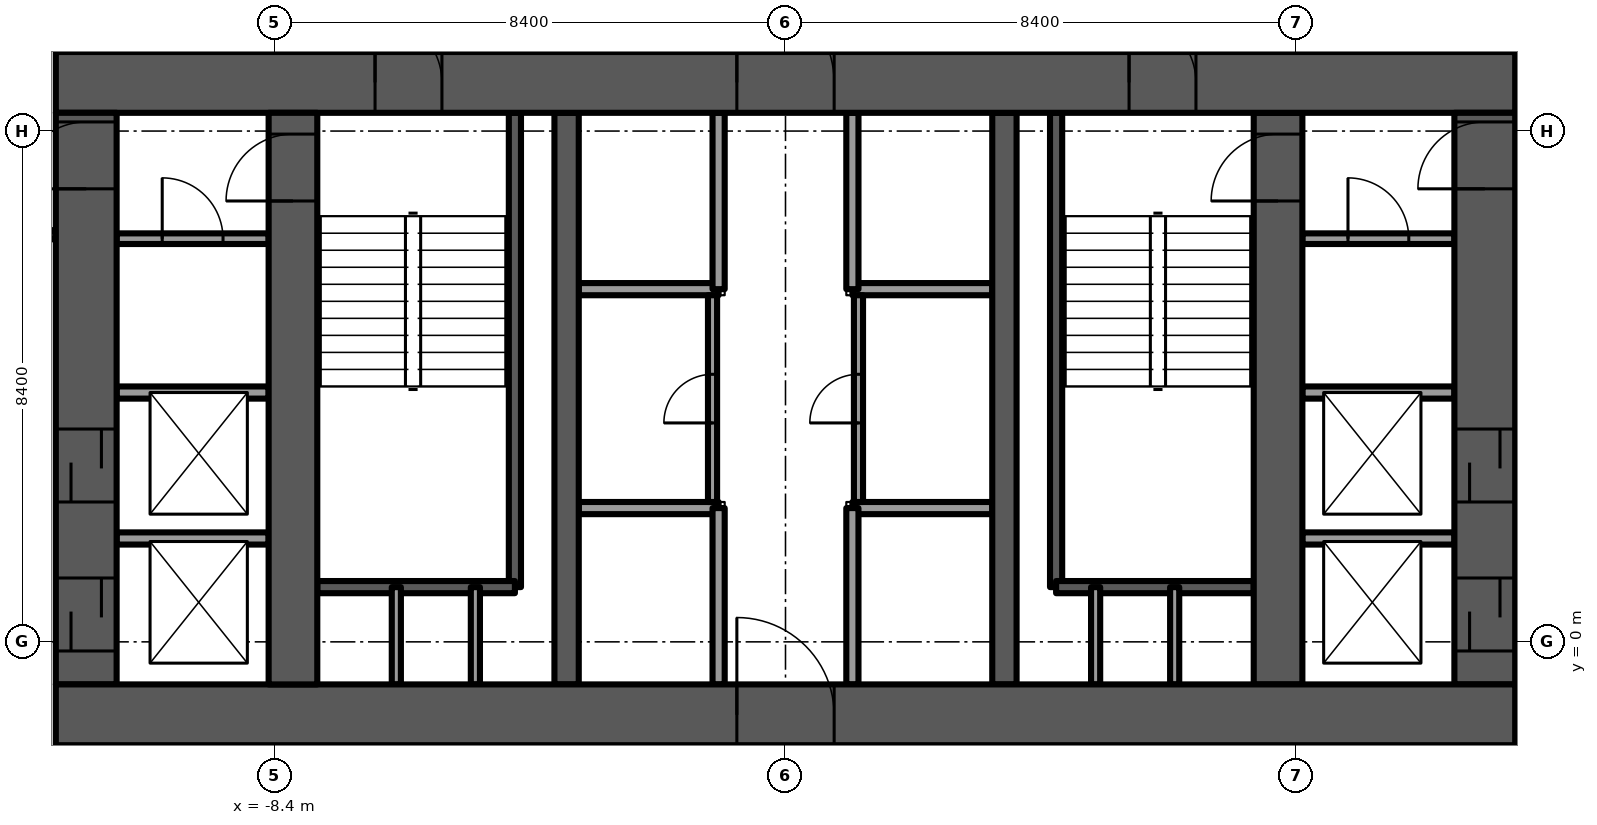
"""IFC4 building model, lengths in metres.
Left out: names, types, materials, properties, quantities, classifications, styles, units other than length and angle.
Written with IfcOpenShell. Run it as: python <this file> out.ifc"""

import sys

from ifc_helpers import new_model, si_unit, direction, frame, frame_2d, origin, place, context, subcontext, project, spatial, rectangle, extrude, element, fill, save


model = new_model("IFC4")
c1 = context("Model", 3, precision=1e-05, world=origin(), true_north=direction((0.0, 1.0)))
c2 = subcontext(c1, "Body", "Model", "MODEL_VIEW")
j1 = project(units=[si_unit("LENGTHUNIT", "METRE"), si_unit("PLANEANGLEUNIT", "RADIAN")], contexts=[c1])
p1 = place(None, origin())
s1 = spatial("IfcSite", under=j1, at=p1, CompositionType="ELEMENT")
p2 = place(p1, origin())
s2 = spatial("IfcBuilding", under=s1, at=p2, CompositionType="ELEMENT")
p3 = place(p2, frame((0.0, 0.0, 131.0)))
s3 = spatial("IfcBuildingStorey", under=s2, at=p3, CompositionType="ELEMENT", Elevation=131.0)
p4 = place(p3, frame((-12.0, -1.2, -0.3), z_axis=(0.0, 0.0, 1.0), x_axis=(1.0, 0.0, 0.0)))
e1 = element("IfcWall", 1, at=p4, inside=s3, PredefinedType="SHEAR", context=c2, shape_type="SweptSolid", body=[
    extrude(rectangle(XDim=24.0, YDim=1.0, at=frame_2d((12.0, 0.0))), origin(), (0.0, 0.0, 1.0), 3.75),
])
p5 = place(p4, frame((11.2, 0.0, 0.0)))
e2 = element("IfcOpeningElement", 2, at=p5, cuts=e1, PredefinedType="OPENING", context=c2, shape_type="SweptSolid", body=[
    extrude(rectangle(XDim=1.6, YDim=2.1, at=frame_2d((0.8, 1.05))), frame((0.0, 0.5, 0.0), z_axis=(0.0, -1.0, 0.0), x_axis=(1.0, 0.0, 0.0)), (0.0, 0.0, 1.0), 1.0),
])
p6 = place(p3, frame((-12.0, 9.2, -0.3), z_axis=(0.0, 0.0, 1.0), x_axis=(1.0, 0.0, 0.0)))
e3 = element("IfcWall", 3, at=p6, inside=s3, PredefinedType="SHEAR", context=c2, shape_type="SweptSolid", body=[
    extrude(rectangle(XDim=24.0, YDim=1.0, at=frame_2d((12.0, 0.0))), origin(), (0.0, 0.0, 1.0), 3.75),
])
p7 = place(p6, frame((11.2, 0.0, 0.0)))
e4 = element("IfcOpeningElement", 4, at=p7, cuts=e3, PredefinedType="OPENING", context=c2, shape_type="SweptSolid", body=[
    extrude(rectangle(XDim=1.6, YDim=2.1, at=frame_2d((0.8, 1.05))), frame((0.0, 0.5, 0.0), z_axis=(0.0, -1.0, 0.0), x_axis=(1.0, 0.0, 0.0)), (0.0, 0.0, 1.0), 1.0),
])
p8 = place(p6, frame((5.25, 0.0, 0.0)))
e5 = element("IfcOpeningElement", 5, at=p8, cuts=e3, PredefinedType="OPENING", context=c2, shape_type="SweptSolid", body=[
    extrude(rectangle(XDim=1.1, YDim=2.1, at=frame_2d((0.55, 1.05))), frame((0.0, 0.5, 0.0), z_axis=(0.0, -1.0, 0.0), x_axis=(1.0, 0.0, 0.0)), (0.0, 0.0, 1.0), 1.0),
])
p9 = place(p6, frame((17.65, 0.0, 0.0)))
e6 = element("IfcOpeningElement", 6, at=p9, cuts=e3, PredefinedType="OPENING", context=c2, shape_type="SweptSolid", body=[
    extrude(rectangle(XDim=1.1, YDim=2.1, at=frame_2d((0.55, 1.05))), frame((0.0, 0.5, 0.0), z_axis=(0.0, -1.0, 0.0), x_axis=(1.0, 0.0, 0.0)), (0.0, 0.0, 1.0), 1.0),
])
p10 = place(p3, frame((-8.1, -0.7, -0.3), z_axis=(0.0, 0.0, 1.0), x_axis=(0.0, 1.0, 0.0)))
e7 = element("IfcWall", 7, at=p10, inside=s3, PredefinedType="SHEAR", context=c2, shape_type="SweptSolid", body=[
    extrude(rectangle(XDim=9.4, YDim=0.8, at=frame_2d((4.7, 0.0))), origin(), (0.0, 0.0, 1.0), 3.75),
])
p11 = place(p10, frame((7.95, 0.0, 0.0)))
e8 = element("IfcOpeningElement", 8, at=p11, cuts=e7, PredefinedType="OPENING", context=c2, shape_type="SweptSolid", body=[
    extrude(rectangle(XDim=1.1, YDim=2.1, at=frame_2d((0.55, 1.05))), frame((0.0, 0.4, 0.0), z_axis=(0.0, -1.0, 0.0), x_axis=(1.0, 0.0, 0.0)), (0.0, 0.0, 1.0), 0.8),
])
p12 = place(p3, frame((8.1, -0.7, -0.3), z_axis=(0.0, 0.0, 1.0), x_axis=(0.0, 1.0, 0.0)))
e9 = element("IfcWall", 9, at=p12, inside=s3, PredefinedType="SHEAR", context=c2, shape_type="SweptSolid", body=[
    extrude(rectangle(XDim=9.4, YDim=0.8, at=frame_2d((4.7, 0.0))), origin(), (0.0, 0.0, 1.0), 3.75),
])
p13 = place(p12, frame((7.95, 0.0, 0.0)))
e10 = element("IfcOpeningElement", 10, at=p13, cuts=e9, PredefinedType="OPENING", context=c2, shape_type="SweptSolid", body=[
    extrude(rectangle(XDim=1.1, YDim=2.1, at=frame_2d((0.55, 1.05))), frame((0.0, 0.4, 0.0), z_axis=(0.0, -1.0, 0.0), x_axis=(1.0, 0.0, 0.0)), (0.0, 0.0, 1.0), 0.8),
])
for number, where, z_axis, x_axis in (
    (11, (-3.6, -0.7, -0.3), (0.0, 0.0, 1.0), (0.0, 1.0, 0.0)),
    (12, (3.6, -0.7, -0.3), (0.0, 0.0, 1.0), (0.0, 1.0, 0.0)),
):
    element("IfcWall", number, at=place(p3, frame(where, z_axis=z_axis, x_axis=x_axis)), inside=s3, PredefinedType="SHEAR", context=c2, shape_type="SweptSolid", body=[
        extrude(rectangle(XDim=9.4, YDim=0.4, at=frame_2d((4.7, 0.0))), origin(), (0.0, 0.0, 1.0), 3.75),
    ])
p14 = place(p3, frame((-11.5, -0.7, -0.3), z_axis=(0.0, 0.0, 1.0), x_axis=(0.0, 1.0, 0.0)))
e13 = element("IfcWall", 13, at=p14, inside=s3, PredefinedType="SHEAR", context=c2, shape_type="SweptSolid", body=[
    extrude(rectangle(XDim=9.4, YDim=1.0, at=frame_2d((4.7, 0.0))), origin(), (0.0, 0.0, 1.0), 3.75),
])
p15 = place(p14, frame((8.15, 0.0, 0.0)))
e14 = element("IfcOpeningElement", 14, at=p15, cuts=e13, PredefinedType="OPENING", context=c2, shape_type="SweptSolid", body=[
    extrude(rectangle(XDim=1.1, YDim=2.1, at=frame_2d((0.55, 1.05))), frame((0.0, 0.5, 0.0), z_axis=(0.0, -1.0, 0.0), x_axis=(1.0, 0.0, 0.0)), (0.0, 0.0, 1.0), 1.0),
])
p16 = place(p14, frame((0.55, 0.0, 0.0)))
e15 = element("IfcOpeningElement", 15, at=p16, cuts=e13, PredefinedType="OPENING", context=c2, shape_type="SweptSolid", body=[
    extrude(rectangle(XDim=1.2, YDim=2.1, at=frame_2d((0.6, 1.05))), frame((0.0, 0.5, 0.0), z_axis=(0.0, -1.0, 0.0), x_axis=(1.0, 0.0, 0.0)), (0.0, 0.0, 1.0), 1.0),
])
p17 = place(p14, frame((3.0, 0.0, 0.0)))
e16 = element("IfcOpeningElement", 16, at=p17, cuts=e13, PredefinedType="OPENING", context=c2, shape_type="SweptSolid", body=[
    extrude(rectangle(XDim=1.2, YDim=2.1, at=frame_2d((0.6, 1.05))), frame((0.0, 0.5, 0.0), z_axis=(0.0, -1.0, 0.0), x_axis=(1.0, 0.0, 0.0)), (0.0, 0.0, 1.0), 1.0),
])
p18 = place(p3, frame((11.5, -0.7, -0.3), z_axis=(0.0, 0.0, 1.0), x_axis=(0.0, 1.0, 0.0)))
e17 = element("IfcWall", 17, at=p18, inside=s3, PredefinedType="SHEAR", context=c2, shape_type="SweptSolid", body=[
    extrude(rectangle(XDim=9.4, YDim=1.0, at=frame_2d((4.7, 0.0))), origin(), (0.0, 0.0, 1.0), 3.75),
])
p19 = place(p18, frame((8.15, 0.0, 0.0)))
e18 = element("IfcOpeningElement", 18, at=p19, cuts=e17, PredefinedType="OPENING", context=c2, shape_type="SweptSolid", body=[
    extrude(rectangle(XDim=1.1, YDim=2.1, at=frame_2d((0.55, 1.05))), frame((0.0, 0.5, 0.0), z_axis=(0.0, -1.0, 0.0), x_axis=(1.0, 0.0, 0.0)), (0.0, 0.0, 1.0), 1.0),
])
p20 = place(p18, frame((0.55, 0.0, 0.0)))
e19 = element("IfcOpeningElement", 19, at=p20, cuts=e17, PredefinedType="OPENING", context=c2, shape_type="SweptSolid", body=[
    extrude(rectangle(XDim=1.2, YDim=2.1, at=frame_2d((0.6, 1.05))), frame((0.0, 0.5, 0.0), z_axis=(0.0, -1.0, 0.0), x_axis=(1.0, 0.0, 0.0)), (0.0, 0.0, 1.0), 1.0),
])
p21 = place(p18, frame((3.0, 0.0, 0.0)))
e20 = element("IfcOpeningElement", 20, at=p21, cuts=e17, PredefinedType="OPENING", context=c2, shape_type="SweptSolid", body=[
    extrude(rectangle(XDim=1.2, YDim=2.1, at=frame_2d((0.6, 1.05))), frame((0.0, 0.5, 0.0), z_axis=(0.0, -1.0, 0.0), x_axis=(1.0, 0.0, 0.0)), (0.0, 0.0, 1.0), 1.0),
])
for number, where, z_axis, x_axis in (
    (21, (-3.4, 2.2, 0.0), (0.0, 0.0, 1.0), (1.0, 0.0, 0.0)),
    (22, (-3.4, 5.8, 0.0), (0.0, 0.0, 1.0), (1.0, 0.0, 0.0)),
    (23, (1.1, 2.2, 0.0), (0.0, 0.0, 1.0), (1.0, 0.0, 0.0)),
    (24, (1.1, 5.8, 0.0), (0.0, 0.0, 1.0), (1.0, 0.0, 0.0)),
):
    element("IfcWall", number, at=place(p3, frame(where, z_axis=z_axis, x_axis=x_axis)), inside=s3, PredefinedType="PARTITIONING", context=c2, shape_type="SweptSolid", body=[
        extrude(rectangle(XDim=2.3, YDim=0.2, at=frame_2d((1.15, 0.0))), origin(), (0.0, 0.0, 1.0), 3.45),
    ])
for number, where, z_axis, x_axis in (
    (25, (-1.1, -0.7, 0.0), (0.0, 0.0, 1.0), (0.0, 1.0, 0.0)),
    (26, (1.1, -0.7, 0.0), (0.0, 0.0, 1.0), (0.0, 1.0, 0.0)),
    (27, (-1.1, 5.8, 0.0), (0.0, 0.0, 1.0), (0.0, 1.0, 0.0)),
    (28, (1.1, 5.8, 0.0), (0.0, 0.0, 1.0), (0.0, 1.0, 0.0)),
):
    element("IfcWall", number, at=place(p3, frame(where, z_axis=z_axis, x_axis=x_axis)), inside=s3, PredefinedType="PARTITIONING", context=c2, shape_type="SweptSolid", body=[
        extrude(rectangle(XDim=2.9, YDim=0.2, at=frame_2d((1.45, 0.0))), origin(), (0.0, 0.0, 1.0), 3.45),
    ])
p22 = place(p3, frame((-4.45, 0.9, -0.3), z_axis=(0.0, 0.0, 1.0), x_axis=(0.0, 1.0, 0.0)))
e29 = element("IfcWall", 29, at=p22, inside=s3, PredefinedType="SOLIDWALL", context=c2, shape_type="SweptSolid", body=[
    extrude(rectangle(XDim=7.8, YDim=0.2, at=frame_2d((3.9, 0.0))), origin(), (0.0, 0.0, 1.0), 3.75),
])
p23 = place(p3, frame((-7.7, 0.9, -0.3), z_axis=(0.0, 0.0, 1.0), x_axis=(1.0, 0.0, 0.0)))
e30 = element("IfcWall", 30, at=p23, inside=s3, PredefinedType="SOLIDWALL", context=c2, shape_type="SweptSolid", body=[
    extrude(rectangle(XDim=3.25, YDim=0.2, at=frame_2d((1.625, 0.0))), origin(), (0.0, 0.0, 1.0), 3.75),
])
for number, where, z_axis, x_axis in (
    (31, (-6.4, -0.7, 0.0), (0.0, 0.0, 1.0), (0.0, 1.0, 0.0)),
    (32, (-5.1, -0.7, 0.0), (0.0, 0.0, 1.0), (0.0, 1.0, 0.0)),
):
    element("IfcWall", number, at=place(p3, frame(where, z_axis=z_axis, x_axis=x_axis)), inside=s3, PredefinedType="PARTITIONING", context=c2, shape_type="SweptSolid", body=[
        extrude(rectangle(XDim=1.6, YDim=0.15, at=frame_2d((0.8, 0.0))), origin(), (0.0, 0.0, 1.0), 3.45),
    ])
p24 = place(p3, frame((4.45, 0.9, -0.3), z_axis=(0.0, 0.0, 1.0), x_axis=(0.0, 1.0, 0.0)))
e33 = element("IfcWall", 33, at=p24, inside=s3, PredefinedType="SOLIDWALL", context=c2, shape_type="SweptSolid", body=[
    extrude(rectangle(XDim=7.8, YDim=0.2, at=frame_2d((3.9, 0.0))), origin(), (0.0, 0.0, 1.0), 3.75),
])
p25 = place(p3, frame((4.45, 0.9, -0.3), z_axis=(0.0, 0.0, 1.0), x_axis=(1.0, 0.0, 0.0)))
e34 = element("IfcWall", 34, at=p25, inside=s3, PredefinedType="SOLIDWALL", context=c2, shape_type="SweptSolid", body=[
    extrude(rectangle(XDim=3.25, YDim=0.2, at=frame_2d((1.625, 0.0))), origin(), (0.0, 0.0, 1.0), 3.75),
])
for number, where, z_axis, x_axis in (
    (35, (5.1, -0.7, 0.0), (0.0, 0.0, 1.0), (0.0, 1.0, 0.0)),
    (36, (6.4, -0.7, 0.0), (0.0, 0.0, 1.0), (0.0, 1.0, 0.0)),
):
    element("IfcWall", number, at=place(p3, frame(where, z_axis=z_axis, x_axis=x_axis)), inside=s3, PredefinedType="PARTITIONING", context=c2, shape_type="SweptSolid", body=[
        extrude(rectangle(XDim=1.6, YDim=0.15, at=frame_2d((0.8, 0.0))), origin(), (0.0, 0.0, 1.0), 3.45),
    ])
p26 = place(p3, frame((-1.2, 2.3, 0.0), z_axis=(0.0, 0.0, 1.0), x_axis=(0.0, 1.0, 0.0)))
e37 = element("IfcWall", 37, at=p26, inside=s3, PredefinedType="PARTITIONING", context=c2, shape_type="SweptSolid", body=[
    extrude(rectangle(XDim=3.4, YDim=0.15, at=frame_2d((1.7, 0.0))), origin(), (0.0, 0.0, 1.0), 3.45),
])
p27 = place(p26, frame((1.3, 0.0, 0.0)))
e38 = element("IfcOpeningElement", 38, at=p27, cuts=e37, PredefinedType="OPENING", context=c2, shape_type="SweptSolid", body=[
    extrude(rectangle(XDim=0.8, YDim=2.1, at=frame_2d((0.4, 1.05))), frame((0.0, 0.075, 0.0), z_axis=(0.0, -1.0, 0.0), x_axis=(1.0, 0.0, 0.0)), (0.0, 0.0, 1.0), 0.15),
])
p28 = place(p3, frame((1.2, 2.3, 0.0), z_axis=(0.0, 0.0, 1.0), x_axis=(0.0, 1.0, 0.0)))
e39 = element("IfcWall", 39, at=p28, inside=s3, PredefinedType="PARTITIONING", context=c2, shape_type="SweptSolid", body=[
    extrude(rectangle(XDim=3.4, YDim=0.15, at=frame_2d((1.7, 0.0))), origin(), (0.0, 0.0, 1.0), 3.45),
])
p29 = place(p28, frame((1.3, 0.0, 0.0)))
e40 = element("IfcOpeningElement", 40, at=p29, cuts=e39, PredefinedType="OPENING", context=c2, shape_type="SweptSolid", body=[
    extrude(rectangle(XDim=0.8, YDim=2.1, at=frame_2d((0.4, 1.05))), frame((0.0, 0.075, 0.0), z_axis=(0.0, -1.0, 0.0), x_axis=(1.0, 0.0, 0.0)), (0.0, 0.0, 1.0), 0.15),
])
for number, where, z_axis, x_axis in (
    (41, (-11.0, 1.7, 0.0), (0.0, 0.0, 1.0), (1.0, 0.0, 0.0)),
    (42, (-11.0, 4.1, 0.0), (0.0, 0.0, 1.0), (1.0, 0.0, 0.0)),
):
    element("IfcWall", number, at=place(p3, frame(where, z_axis=z_axis, x_axis=x_axis)), inside=s3, PredefinedType="PARTITIONING", context=c2, shape_type="SweptSolid", body=[
        extrude(rectangle(XDim=2.5, YDim=0.2, at=frame_2d((1.25, 0.0))), origin(), (0.0, 0.0, 1.0), 3.45),
    ])
p30 = place(p3, frame((-11.0, 6.63, 0.0), z_axis=(0.0, 0.0, 1.0), x_axis=(1.0, 0.0, 0.0)))
e43 = element("IfcWall", 43, at=p30, inside=s3, PredefinedType="PARTITIONING", context=c2, shape_type="SweptSolid", body=[
    extrude(rectangle(XDim=2.5, YDim=0.175, at=frame_2d((1.25, 0.0))), origin(), (0.0, 0.0, 1.0), 3.45),
])
p31 = place(p30, frame((0.75, 0.0, 0.0)))
e44 = element("IfcOpeningElement", 44, at=p31, cuts=e43, PredefinedType="OPENING", context=c2, shape_type="SweptSolid", body=[
    extrude(rectangle(XDim=1.0, YDim=2.1, at=frame_2d((0.5, 1.05))), frame((0.0, 0.087, 0.0), z_axis=(0.0, -1.0, 0.0), x_axis=(1.0, 0.0, 0.0)), (0.0, 0.0, 1.0), 0.175),
])
for number, where, z_axis, x_axis in (
    (45, (8.5, 1.7, 0.0), (0.0, 0.0, 1.0), (1.0, 0.0, 0.0)),
    (46, (8.5, 4.1, 0.0), (0.0, 0.0, 1.0), (1.0, 0.0, 0.0)),
):
    element("IfcWall", number, at=place(p3, frame(where, z_axis=z_axis, x_axis=x_axis)), inside=s3, PredefinedType="PARTITIONING", context=c2, shape_type="SweptSolid", body=[
        extrude(rectangle(XDim=2.5, YDim=0.2, at=frame_2d((1.25, 0.0))), origin(), (0.0, 0.0, 1.0), 3.45),
    ])
p32 = place(p3, frame((8.5, 6.63, 0.0), z_axis=(0.0, 0.0, 1.0), x_axis=(1.0, 0.0, 0.0)))
e47 = element("IfcWall", 47, at=p32, inside=s3, PredefinedType="PARTITIONING", context=c2, shape_type="SweptSolid", body=[
    extrude(rectangle(XDim=2.5, YDim=0.175, at=frame_2d((1.25, 0.0))), origin(), (0.0, 0.0, 1.0), 3.45),
])
p33 = place(p32, frame((0.75, 0.0, 0.0)))
e48 = element("IfcOpeningElement", 48, at=p33, cuts=e47, PredefinedType="OPENING", context=c2, shape_type="SweptSolid", body=[
    extrude(rectangle(XDim=1.0, YDim=2.1, at=frame_2d((0.5, 1.05))), frame((0.0, 0.087, 0.0), z_axis=(0.0, -1.0, 0.0), x_axis=(1.0, 0.0, 0.0)), (0.0, 0.0, 1.0), 0.175),
])
for number, where, z_axis, x_axis in (
    (49, (-13.44, 6.695, 0.0), (0.0, 0.0, 1.0), (1.0, 0.0, 0.0)),
    (50, (12.01, 6.695, 0.0), (0.0, 0.0, 1.0), (1.0, 0.0, 0.0)),
):
    element("IfcWall", number, at=place(p3, frame(where, z_axis=z_axis, x_axis=x_axis)), inside=s3, PredefinedType="PARTITIONING", context=c2, shape_type="SweptSolid", body=[
        extrude(rectangle(XDim=1.43, YDim=0.15, at=frame_2d((0.715, 0.0))), origin(), (0.0, 0.0, 1.0), 3.45),
    ])
p34 = place(p5, origin())
e51 = element("IfcDoor", 51, at=p34, inside=s3, OperationType="DOUBLE_DOOR_SINGLE_SWING", PredefinedType="DOOR", context=c2, shape_type="SweptSolid", body=[
    extrude(rectangle(XDim=1.6, YDim=2.1, at=frame_2d((0.8, 1.05))), frame((0.0, 0.025, 0.0), z_axis=(0.0, -1.0, 0.0), x_axis=(1.0, 0.0, 0.0)), (0.0, 0.0, 1.0), 0.05),
])
fill(e2, e51)
p35 = place(p7, origin())
e52 = element("IfcDoor", 52, at=p35, inside=s3, OperationType="DOUBLE_DOOR_SINGLE_SWING", PredefinedType="DOOR", context=c2, shape_type="SweptSolid", body=[
    extrude(rectangle(XDim=1.6, YDim=2.1, at=frame_2d((0.8, 1.05))), frame((0.0, 0.025, 0.0), z_axis=(0.0, -1.0, 0.0), x_axis=(1.0, 0.0, 0.0)), (0.0, 0.0, 1.0), 0.05),
])
fill(e4, e52)
p36 = place(p8, origin())
e53 = element("IfcDoor", 53, at=p36, inside=s3, OperationType="SINGLE_SWING_LEFT", PredefinedType="DOOR", context=c2, shape_type="SweptSolid", body=[
    extrude(rectangle(XDim=1.1, YDim=2.1, at=frame_2d((0.55, 1.05))), frame((0.0, 0.025, 0.0), z_axis=(0.0, -1.0, 0.0), x_axis=(1.0, 0.0, 0.0)), (0.0, 0.0, 1.0), 0.05),
])
fill(e5, e53)
p37 = place(p11, origin())
e54 = element("IfcDoor", 54, at=p37, inside=s3, OperationType="SINGLE_SWING_RIGHT", PredefinedType="DOOR", context=c2, shape_type="SweptSolid", body=[
    extrude(rectangle(XDim=1.1, YDim=2.1, at=frame_2d((0.55, 1.05))), frame((0.0, 0.025, 0.0), z_axis=(0.0, -1.0, 0.0), x_axis=(1.0, 0.0, 0.0)), (0.0, 0.0, 1.0), 0.05),
])
fill(e8, e54)
p38 = place(p9, origin())
e55 = element("IfcDoor", 55, at=p38, inside=s3, OperationType="SINGLE_SWING_RIGHT", PredefinedType="DOOR", context=c2, shape_type="SweptSolid", body=[
    extrude(rectangle(XDim=1.1, YDim=2.1, at=frame_2d((0.55, 1.05))), frame((0.0, 0.025, 0.0), z_axis=(0.0, -1.0, 0.0), x_axis=(1.0, 0.0, 0.0)), (0.0, 0.0, 1.0), 0.05),
])
fill(e6, e55)
p39 = place(p13, origin())
e56 = element("IfcDoor", 56, at=p39, inside=s3, OperationType="SINGLE_SWING_LEFT", PredefinedType="DOOR", context=c2, shape_type="SweptSolid", body=[
    extrude(rectangle(XDim=1.1, YDim=2.1, at=frame_2d((0.55, 1.05))), frame((0.0, 0.025, 0.0), z_axis=(0.0, -1.0, 0.0), x_axis=(1.0, 0.0, 0.0)), (0.0, 0.0, 1.0), 0.05),
])
fill(e10, e56)
p40 = place(p27, origin())
e57 = element("IfcDoor", 57, at=p40, inside=s3, OperationType="SINGLE_SWING_LEFT", PredefinedType="DOOR", context=c2, shape_type="SweptSolid", body=[
    extrude(rectangle(XDim=0.8, YDim=2.1, at=frame_2d((0.4, 1.05))), frame((0.0, 0.025, 0.0), z_axis=(0.0, -1.0, 0.0), x_axis=(1.0, 0.0, 0.0)), (0.0, 0.0, 1.0), 0.05),
])
fill(e38, e57)
p41 = place(p29, origin())
e58 = element("IfcDoor", 58, at=p41, inside=s3, OperationType="SINGLE_SWING_RIGHT", PredefinedType="DOOR", context=c2, shape_type="SweptSolid", body=[
    extrude(rectangle(XDim=0.8, YDim=2.1, at=frame_2d((0.4, 1.05))), frame((0.0, 0.025, 0.0), z_axis=(0.0, -1.0, 0.0), x_axis=(1.0, 0.0, 0.0)), (0.0, 0.0, 1.0), 0.05),
])
fill(e40, e58)
p42 = place(p31, origin())
e59 = element("IfcDoor", 59, at=p42, inside=s3, OperationType="SINGLE_SWING_LEFT", PredefinedType="DOOR", context=c2, shape_type="SweptSolid", body=[
    extrude(rectangle(XDim=1.0, YDim=2.1, at=frame_2d((0.5, 1.05))), frame((0.0, 0.025, 0.0), z_axis=(0.0, -1.0, 0.0), x_axis=(1.0, 0.0, 0.0)), (0.0, 0.0, 1.0), 0.05),
])
fill(e44, e59)
p43 = place(p15, origin())
e60 = element("IfcDoor", 60, at=p43, inside=s3, OperationType="SINGLE_SWING_LEFT", PredefinedType="DOOR", context=c2, shape_type="SweptSolid", body=[
    extrude(rectangle(XDim=1.1, YDim=2.1, at=frame_2d((0.55, 1.05))), frame((0.0, 0.025, 0.0), z_axis=(0.0, -1.0, 0.0), x_axis=(1.0, 0.0, 0.0)), (0.0, 0.0, 1.0), 0.05),
])
fill(e14, e60)
p44 = place(p16, origin())
e61 = element("IfcDoor", 61, at=p44, inside=s3, OperationType="SLIDING_TO_LEFT", PredefinedType="DOOR", context=c2, shape_type="SweptSolid", body=[
    extrude(rectangle(XDim=1.2, YDim=2.1, at=frame_2d((0.6, 1.05))), frame((0.0, 0.025, 0.0), z_axis=(0.0, -1.0, 0.0), x_axis=(1.0, 0.0, 0.0)), (0.0, 0.0, 1.0), 0.05),
])
fill(e15, e61)
p45 = place(p17, origin())
e62 = element("IfcDoor", 62, at=p45, inside=s3, OperationType="SLIDING_TO_LEFT", PredefinedType="DOOR", context=c2, shape_type="SweptSolid", body=[
    extrude(rectangle(XDim=1.2, YDim=2.1, at=frame_2d((0.6, 1.05))), frame((0.0, 0.025, 0.0), z_axis=(0.0, -1.0, 0.0), x_axis=(1.0, 0.0, 0.0)), (0.0, 0.0, 1.0), 0.05),
])
fill(e16, e62)
p46 = place(p33, origin())
e63 = element("IfcDoor", 63, at=p46, inside=s3, OperationType="SINGLE_SWING_RIGHT", PredefinedType="DOOR", context=c2, shape_type="SweptSolid", body=[
    extrude(rectangle(XDim=1.0, YDim=2.1, at=frame_2d((0.5, 1.05))), frame((0.0, 0.025, 0.0), z_axis=(0.0, -1.0, 0.0), x_axis=(1.0, 0.0, 0.0)), (0.0, 0.0, 1.0), 0.05),
])
fill(e48, e63)
p47 = place(p19, origin())
e64 = element("IfcDoor", 64, at=p47, inside=s3, OperationType="SINGLE_SWING_RIGHT", PredefinedType="DOOR", context=c2, shape_type="SweptSolid", body=[
    extrude(rectangle(XDim=1.1, YDim=2.1, at=frame_2d((0.55, 1.05))), frame((0.0, 0.025, 0.0), z_axis=(0.0, -1.0, 0.0), x_axis=(1.0, 0.0, 0.0)), (0.0, 0.0, 1.0), 0.05),
])
fill(e18, e64)
p48 = place(p20, origin())
e65 = element("IfcDoor", 65, at=p48, inside=s3, OperationType="SLIDING_TO_LEFT", PredefinedType="DOOR", context=c2, shape_type="SweptSolid", body=[
    extrude(rectangle(XDim=1.2, YDim=2.1, at=frame_2d((0.6, 1.05))), frame((0.0, 0.025, 0.0), z_axis=(0.0, -1.0, 0.0), x_axis=(1.0, 0.0, 0.0)), (0.0, 0.0, 1.0), 0.05),
])
fill(e19, e65)
p49 = place(p21, origin())
e66 = element("IfcDoor", 66, at=p49, inside=s3, OperationType="SLIDING_TO_LEFT", PredefinedType="DOOR", context=c2, shape_type="SweptSolid", body=[
    extrude(rectangle(XDim=1.2, YDim=2.1, at=frame_2d((0.6, 1.05))), frame((0.0, 0.025, 0.0), z_axis=(0.0, -1.0, 0.0), x_axis=(1.0, 0.0, 0.0)), (0.0, 0.0, 1.0), 0.05),
])
fill(e20, e66)
save(model, sys.argv[1])
